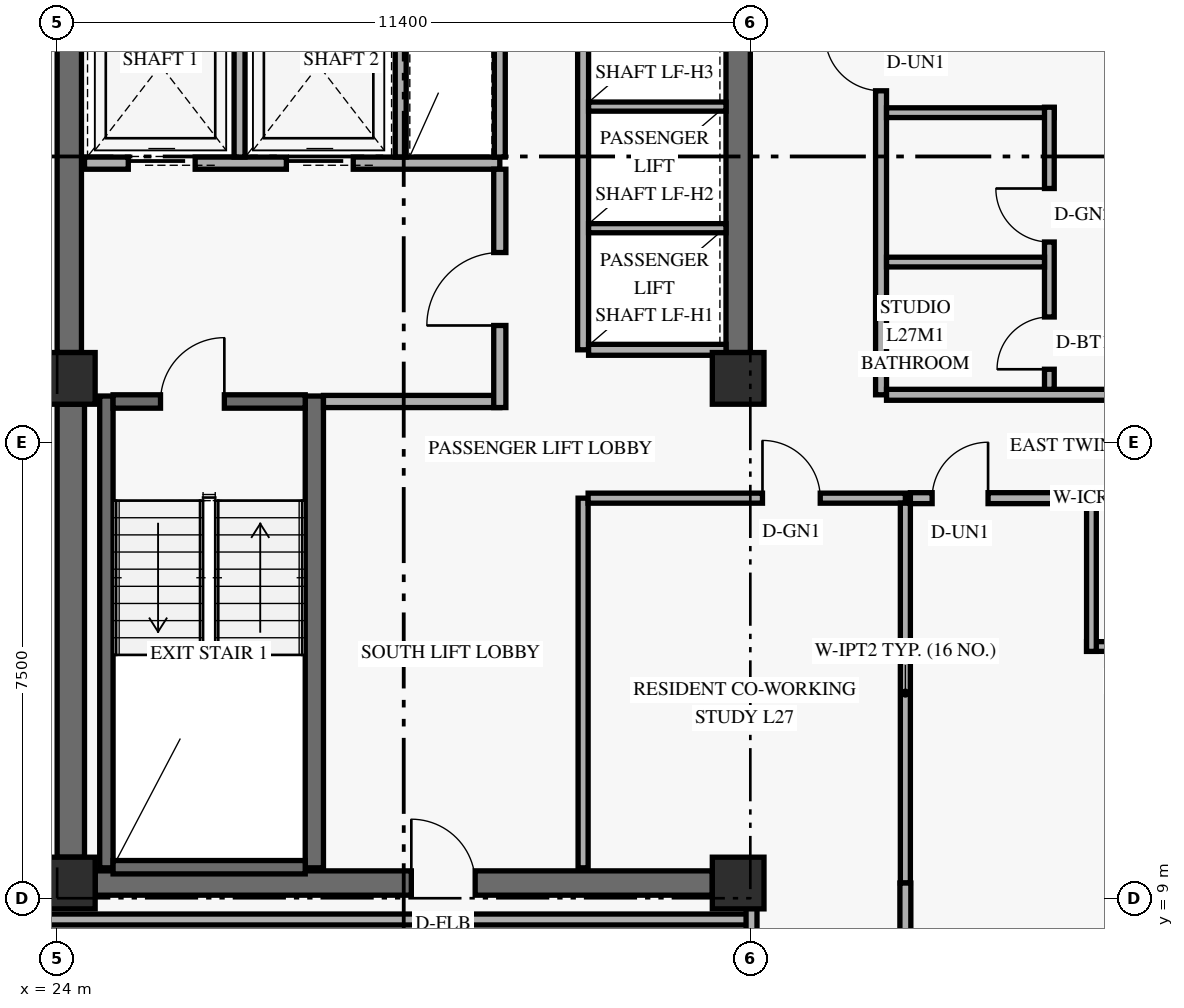
"""IFC4 building model, lengths in metres.
Left out: names, types, materials, properties, quantities, classifications, styles, units other than length and angle.
Written with IfcOpenShell. Run it as: python <this file> out.ifc"""

import sys

from ifc_helpers import new_model, si_unit, direction, frame, frame_2d, origin, origin_2d, place, context, subcontext, project, spatial, rectangle, extrude, element, fill, save


model = new_model("IFC4")
c1 = context("Model", 3, precision=1e-05, world=origin(), true_north=direction((0.0, 1.0)))
c2 = subcontext(c1, "Body", "Model", "MODEL_VIEW")
j1 = project(units=[si_unit("LENGTHUNIT", "METRE"), si_unit("PLANEANGLEUNIT", "RADIAN")], contexts=[c1])
p1 = place(None, origin())
s1 = spatial("IfcSite", under=j1, at=p1, CompositionType="ELEMENT")
p2 = place(p1, origin())
s2 = spatial("IfcBuilding", under=s1, at=p2, CompositionType="ELEMENT")
p3 = place(p2, frame((0.0, 0.0, 106.2)))
s3 = spatial("IfcBuildingStorey", under=s2, at=p3, CompositionType="ELEMENT", Elevation=106.2)
p4 = place(p3, frame((24.225, 9.675, 0.0), z_axis=(0.0, 0.0, 1.0), x_axis=(0.0, 1.0, 0.0)))
e1 = element("IfcWall", 1, at=p4, inside=s3, PredefinedType="SHEAR", context=c2, shape_type="SweptSolid", body=[
    extrude(rectangle(XDim=7.45, YDim=0.45, at=frame_2d((3.725, 0.0))), origin(), (0.0, 0.0, 1.0), 2.749),
])
p5 = place(p3, frame((24.2, 17.975, 0.0), z_axis=(0.0, 0.0, 1.0), x_axis=(0.0, 1.0, 0.0)))
e2 = element("IfcWall", 2, at=p5, inside=s3, PredefinedType="SHEAR", context=c2, shape_type="SweptSolid", body=[
    extrude(rectangle(XDim=11.8, YDim=0.4, at=frame_2d((5.9, 0.0))), origin(), (0.0, 0.0, 1.0), 2.749),
])
p6 = place(p3, frame((35.2, 17.975, 0.0), z_axis=(0.0, 0.0, 1.0), x_axis=(0.0, 1.0, 0.0)))
e3 = element("IfcWall", 3, at=p6, inside=s3, PredefinedType="SHEAR", context=c2, shape_type="SweptSolid", body=[
    extrude(rectangle(XDim=10.125, YDim=0.4, at=frame_2d((5.062, 0.0))), origin(), (0.0, 0.0, 1.0), 2.749),
])
p7 = place(p3, frame((24.625, 9.25, 0.0), z_axis=(0.0, 0.0, 1.0), x_axis=(1.0, 0.0, 0.0)))
e4 = element("IfcWall", 4, at=p7, inside=s3, PredefinedType="SHEAR", context=c2, shape_type="SweptSolid", body=[
    extrude(rectangle(XDim=10.15, YDim=0.4, at=frame_2d((5.075, 0.0))), origin(), (0.0, 0.0, 1.0), 3.36),
])
p8 = place(p7, frame((5.2, 0.0, 0.0)))
e5 = element("IfcOpeningElement", 5, at=p8, cuts=e4, PredefinedType="OPENING", context=c2, shape_type="SweptSolid", body=[
    extrude(rectangle(XDim=1.05, YDim=2.15, at=frame_2d((0.525, 1.075))), frame((0.0, 0.21, 0.0), z_axis=(0.0, -1.0, 0.0), x_axis=(1.0, 0.0, 0.0)), (0.0, 0.0, 1.0), 0.42),
])
p9 = place(p3, frame((24.81, 9.5, 0.0), z_axis=(0.0, 0.0, 1.0), x_axis=(0.0, 1.0, 0.0)))
e6 = element("IfcWall", 6, at=p9, inside=s3, PredefinedType="SHEAR", context=c2, shape_type="SweptSolid", body=[
    extrude(rectangle(XDim=7.76, YDim=0.22, at=frame_2d((3.88, 0.0))), origin(), (0.0, 0.0, 1.0), 3.36),
])
p10 = place(p3, frame((28.23, 9.5, 0.0), z_axis=(0.0, 0.0, 1.0), x_axis=(0.0, 1.0, 0.0)))
e7 = element("IfcWall", 7, at=p10, inside=s3, PredefinedType="SHEAR", context=c2, shape_type="SweptSolid", body=[
    extrude(rectangle(XDim=7.76, YDim=0.3, at=frame_2d((3.88, 0.0))), origin(), (0.0, 0.0, 1.0), 3.36),
])
p11 = place(p3, frame((24.92, 9.51, 0.0), z_axis=(0.0, 0.0, 1.0), x_axis=(1.0, 0.0, 0.0)))
e8 = element("IfcWall", 8, at=p11, inside=s3, PredefinedType="SHEAR", context=c2, shape_type="SweptSolid", body=[
    extrude(rectangle(XDim=3.16, YDim=0.22, at=frame_2d((1.58, 0.0))), origin(), (0.0, 0.0, 1.0), 3.36),
])
p12 = place(p3, frame((24.92, 17.17, 0.0), z_axis=(0.0, 0.0, 1.0), x_axis=(1.0, 0.0, 0.0)))
e9 = element("IfcWall", 9, at=p12, inside=s3, PredefinedType="SHEAR", context=c2, shape_type="SweptSolid", body=[
    extrude(rectangle(XDim=3.16, YDim=0.22, at=frame_2d((1.58, 0.0))), origin(), (0.0, 0.0, 1.0), 3.36),
])
p13 = place(p12, frame((0.78, 0.0, 0.0)))
e10 = element("IfcOpeningElement", 10, at=p13, cuts=e9, PredefinedType="OPENING", context=c2, shape_type="SweptSolid", body=[
    extrude(rectangle(XDim=1.05, YDim=2.15, at=frame_2d((0.525, 1.075))), frame((0.0, 0.12, 0.0), z_axis=(0.0, -1.0, 0.0), x_axis=(1.0, 0.0, 0.0)), (0.0, 0.0, 1.0), 0.24),
])
for number, where, z_axis, x_axis in (
    (11, (24.2, 9.25, 0.0), (0.0, 0.0, 1.0), (1.0, 0.0, 0.0)),
    (12, (24.2, 17.55, 0.0), (0.0, 0.0, 1.0), (1.0, 0.0, 0.0)),
    (13, (35.2, 9.25, 0.0), (0.0, 0.0, 1.0), (1.0, 0.0, 0.0)),
    (14, (35.2, 17.55, 0.0), (0.0, 0.0, 1.0), (1.0, 0.0, 0.0)),
):
    element("IfcColumn", number, at=place(p3, frame(where, z_axis=z_axis, x_axis=x_axis)), inside=s3, PredefinedType="COLUMN", context=c2, shape_type="SweptSolid", body=[
        extrude(rectangle(XDim=0.85, YDim=0.85, at=origin_2d()), origin(), (0.0, 0.0, 1.0), 3.6),
    ])
p14 = place(p3, frame((24.45, 21.09, 0.0), z_axis=(0.0, 0.0, 1.0), x_axis=(1.0, 0.0, 0.0)))
e15 = element("IfcWall", 15, at=p14, inside=s3, PredefinedType="STANDARD", context=c2, shape_type="SweptSolid", body=[
    extrude(rectangle(XDim=6.83, YDim=0.2, at=frame_2d((3.415, 0.0))), origin(), (0.0, 0.0, 1.0), 3.36),
])
p15 = place(p14, frame((0.72, 0.0, 0.0)))
e16 = element("IfcOpeningElement", 16, at=p15, cuts=e15, PredefinedType="OPENING", context=c2, shape_type="SweptSolid", body=[
    extrude(rectangle(XDim=1.1, YDim=2.2, at=frame_2d((0.55, 1.1))), frame((0.0, 0.11, 0.0), z_axis=(0.0, -1.0, 0.0), x_axis=(1.0, 0.0, 0.0)), (0.0, 0.0, 1.0), 0.22),
])
p16 = place(p14, frame((3.32, 0.0, 0.0)))
e17 = element("IfcOpeningElement", 17, at=p16, cuts=e15, PredefinedType="OPENING", context=c2, shape_type="SweptSolid", body=[
    extrude(rectangle(XDim=1.1, YDim=2.2, at=frame_2d((0.55, 1.1))), frame((0.0, 0.11, 0.0), z_axis=(0.0, -1.0, 0.0), x_axis=(1.0, 0.0, 0.0)), (0.0, 0.0, 1.0), 0.22),
])
p17 = place(p3, frame((28.38, 17.17, 0.0), z_axis=(0.0, 0.0, 1.0), x_axis=(1.0, 0.0, 0.0)))
e18 = element("IfcWall", 18, at=p17, inside=s3, PredefinedType="STANDARD", context=c2, shape_type="SweptSolid", body=[
    extrude(rectangle(XDim=2.9, YDim=0.2, at=frame_2d((1.45, 0.0))), origin(), (0.0, 0.0, 1.0), 3.36),
])
p18 = place(p3, frame((31.28, 17.07, 0.0), z_axis=(0.0, 0.0, 1.0), x_axis=(0.0, 1.0, 0.0)))
e19 = element("IfcWall", 19, at=p18, inside=s3, PredefinedType="STANDARD", context=c2, shape_type="SweptSolid", body=[
    extrude(rectangle(XDim=3.92, YDim=0.2, at=frame_2d((1.96, 0.0))), origin(), (0.0, 0.0, 1.0), 2.731),
])
p19 = place(p18, frame((1.35, 0.0, 0.0)))
e20 = element("IfcOpeningElement", 20, at=p19, cuts=e19, PredefinedType="OPENING", context=c2, shape_type="SweptSolid", body=[
    extrude(rectangle(XDim=1.2, YDim=2.15, at=frame_2d((0.6, 1.075))), frame((0.0, 0.11, 0.0), z_axis=(0.0, -1.0, 0.0), x_axis=(1.0, 0.0, 0.0)), (0.0, 0.0, 1.0), 0.22),
])
p20 = place(p3, frame((27.0, 21.19, 0.0), z_axis=(0.0, 0.0, 1.0), x_axis=(0.0, 1.0, 0.0)))
e21 = element("IfcWall", 21, at=p20, inside=s3, PredefinedType="STANDARD", context=c2, shape_type="SweptSolid", body=[
    extrude(rectangle(XDim=3.11, YDim=0.18, at=frame_2d((1.555, 0.0))), origin(), (0.0, 0.0, 1.0), 3.36),
])
for number, where, z_axis, x_axis in (
    (22, (29.65, 21.19, 0.0), (0.0, 0.0, 1.0), (0.0, 1.0, 0.0)),
    (23, (31.28, 21.19, 0.0), (0.0, 0.0, 1.0), (0.0, 1.0, 0.0)),
):
    element("IfcWall", number, at=place(p3, frame(where, z_axis=z_axis, x_axis=x_axis)), inside=s3, PredefinedType="STANDARD", context=c2, shape_type="SweptSolid", body=[
        extrude(rectangle(XDim=3.02, YDim=0.18, at=frame_2d((1.51, 0.0))), origin(), (0.0, 0.0, 1.0), 3.36),
    ])
p21 = place(p3, frame((32.65, 18.02, 0.0), z_axis=(0.0, 0.0, 1.0), x_axis=(0.0, 1.0, 0.0)))
e24 = element("IfcWall", 24, at=p21, inside=s3, PredefinedType="STANDARD", context=c2, shape_type="SweptSolid", body=[
    extrude(rectangle(XDim=10.06, YDim=0.18, at=frame_2d((5.03, 0.0))), origin(), (0.0, 0.0, 1.0), 3.36),
])
p22 = place(p3, frame((32.74, 18.02, 0.0), z_axis=(0.0, 0.0, 1.0), x_axis=(1.0, 0.0, 0.0)))
e25 = element("IfcWall", 25, at=p22, inside=s3, PredefinedType="STANDARD", context=c2, shape_type="SweptSolid", body=[
    extrude(rectangle(XDim=2.26, YDim=0.18, at=frame_2d((1.13, 0.0))), origin(), (0.0, 0.0, 1.0), 3.36),
])
for number, where, z_axis, x_axis in (
    (26, (32.74, 20.02, 0.0), (0.0, 0.0, 1.0), (1.0, 0.0, 0.0)),
    (27, (32.74, 22.02, 0.0), (0.0, 0.0, 1.0), (1.0, 0.0, 0.0)),
):
    element("IfcWall", number, at=place(p3, frame(where, z_axis=z_axis, x_axis=x_axis)), inside=s3, PredefinedType="STANDARD", context=c2, shape_type="SweptSolid", body=[
        extrude(rectangle(XDim=2.26, YDim=0.15, at=frame_2d((1.13, 0.0))), origin(), (0.0, 0.0, 1.0), 3.36),
    ])
p23 = place(p3, frame((32.65, 9.5, 0.0), z_axis=(0.0, 0.0, 1.0), x_axis=(0.0, 1.0, 0.0)))
e28 = element("IfcWall", 28, at=p23, inside=s3, PredefinedType="PARTITIONING", context=c2, shape_type="SweptSolid", body=[
    extrude(rectangle(XDim=6.08, YDim=0.165, at=frame_2d((3.04, 0.0))), origin(), (0.0, 0.0, 1.0), 3.36),
])
p24 = place(p3, frame((32.732, 15.58, 0.0), z_axis=(0.0, 0.0, 1.0), x_axis=(1.0, 0.0, 0.0)))
e29 = element("IfcWall", 29, at=p24, inside=s3, PredefinedType="PARTITIONING", context=c2, shape_type="SweptSolid", body=[
    extrude(rectangle(XDim=5.218, YDim=0.165, at=frame_2d((2.609, 0.0))), origin(), (0.0, 0.0, 1.0), 2.731),
])
p25 = place(p24, frame((2.867, 0.0, 0.0)))
e30 = element("IfcOpeningElement", 30, at=p25, cuts=e29, PredefinedType="OPENING", context=c2, shape_type="SweptSolid", body=[
    extrude(rectangle(XDim=0.95, YDim=2.15, at=frame_2d((0.475, 1.075))), frame((0.0, 0.093, 0.0), z_axis=(0.0, -1.0, 0.0), x_axis=(1.0, 0.0, 0.0)), (0.0, 0.0, 1.0), 0.185),
])
p26 = place(p3, frame((37.95, 9.25, 0.0), z_axis=(0.0, 0.0, 1.0), x_axis=(0.0, 1.0, 0.0)))
e31 = element("IfcWall", 31, at=p26, inside=s3, PredefinedType="PARTITIONING", context=c2, shape_type="SweptSolid", body=[
    extrude(rectangle(XDim=6.248, YDim=0.165, at=frame_2d((3.124, 0.0))), origin(), (0.0, 0.0, 1.0), 2.731),
])
p27 = place(p3, frame((37.55, 17.28, 0.0), z_axis=(0.0, 0.0, 1.0), x_axis=(0.0, 1.0, 0.0)))
e32 = element("IfcWall", 32, at=p27, inside=s3, PredefinedType="STANDARD", context=c2, shape_type="SweptSolid", body=[
    extrude(rectangle(XDim=10.28, YDim=0.18, at=frame_2d((5.14, 0.0))), origin(), (0.0, 0.0, 1.0), 2.731),
])
p28 = place(p27, frame((5.0, 0.0, 0.0)))
e33 = element("IfcOpeningElement", 33, at=p28, cuts=e32, PredefinedType="OPENING", context=c2, shape_type="SweptSolid", body=[
    extrude(rectangle(XDim=0.92, YDim=2.15, at=frame_2d((0.46, 1.075))), frame((0.0, 0.1, 0.0), z_axis=(0.0, -1.0, 0.0), x_axis=(1.0, 0.0, 0.0)), (0.0, 0.0, 1.0), 0.2),
])
p29 = place(p3, frame((38.032, 15.58, 0.0), z_axis=(0.0, 0.0, 1.0), x_axis=(1.0, 0.0, 0.0)))
e34 = element("IfcWall", 34, at=p29, inside=s3, PredefinedType="STANDARD", context=c2, shape_type="SweptSolid", body=[
    extrude(rectangle(XDim=7.568, YDim=0.18, at=frame_2d((3.784, 0.0))), origin(), (0.0, 0.0, 1.0), 2.731),
])
p30 = place(p29, frame((0.357, 0.0, 0.0)))
e35 = element("IfcOpeningElement", 35, at=p30, cuts=e34, PredefinedType="OPENING", context=c2, shape_type="SweptSolid", body=[
    extrude(rectangle(XDim=0.92, YDim=2.15, at=frame_2d((0.46, 1.075))), frame((0.0, 0.1, 0.0), z_axis=(0.0, -1.0, 0.0), x_axis=(1.0, 0.0, 0.0)), (0.0, 0.0, 1.0), 0.2),
])
p31 = place(p3, frame((37.64, 17.28, 0.0), z_axis=(0.0, 0.0, 1.0), x_axis=(1.0, 0.0, 0.0)))
e36 = element("IfcWall", 36, at=p31, inside=s3, PredefinedType="STANDARD", context=c2, shape_type="SweptSolid", body=[
    extrude(rectangle(XDim=7.96, YDim=0.18, at=frame_2d((3.98, 0.0))), origin(), (0.0, 0.0, 1.0), 2.731),
])
p32 = place(p3, frame((23.85, 8.65, 0.0), z_axis=(0.0, 0.0, 1.0), x_axis=(1.0, 0.0, 0.0)))
e37 = element("IfcWall", 37, at=p32, inside=s3, PredefinedType="STANDARD", context=c2, shape_type="SweptSolid", body=[
    extrude(rectangle(XDim=11.57, YDim=0.18, at=frame_2d((5.785, 0.0))), origin(), (0.0, 0.0, 1.0), 2.731),
])
p33 = place(p3, frame((35.42, 2.98, 0.0), z_axis=(0.0, 0.0, 1.0), x_axis=(0.0, 1.0, 0.0)))
e38 = element("IfcWall", 38, at=p33, inside=s3, PredefinedType="PARTITIONING", context=c2, shape_type="SweptSolid", body=[
    extrude(rectangle(XDim=6.27, YDim=0.18, at=frame_2d((3.135, 0.0))), origin(), (0.0, 0.0, 1.0), 2.731),
])
p34 = place(p33, frame((1.57, 0.0, 0.0)))
e39 = element("IfcOpeningElement", 39, at=p34, cuts=e38, PredefinedType="OPENING", context=c2, shape_type="SweptSolid", body=[
    extrude(rectangle(XDim=0.88, YDim=2.12, at=frame_2d((0.44, 1.06))), frame((0.0, 0.1, 0.0), z_axis=(0.0, -1.0, 0.0), x_axis=(1.0, 0.0, 0.0)), (0.0, 0.0, 1.0), 0.2),
])
p35 = place(p3, frame((37.95, 2.98, 0.0), z_axis=(0.0, 0.0, 1.0), x_axis=(0.0, 1.0, 0.0)))
e40 = element("IfcWall", 40, at=p35, inside=s3, PredefinedType="PARTITIONING", context=c2, shape_type="SweptSolid", body=[
    extrude(rectangle(XDim=6.27, YDim=0.18, at=frame_2d((3.135, 0.0))), origin(), (0.0, 0.0, 1.0), 2.731),
])
p36 = place(p3, frame((40.93, 13.14, 0.0), z_axis=(0.0, 0.0, 1.0), x_axis=(1.0, 0.0, 0.0)))
e41 = element("IfcWall", 41, at=p36, inside=s3, PredefinedType="PLUMBINGWALL", context=c2, shape_type="SweptSolid", body=[
    extrude(rectangle(XDim=4.67, YDim=0.16, at=frame_2d((2.335, 0.0))), origin(), (0.0, 0.0, 1.0), 2.731),
])
p37 = place(p36, frame((0.35, 0.0, 0.0)))
e42 = element("IfcOpeningElement", 42, at=p37, cuts=e41, PredefinedType="OPENING", context=c2, shape_type="SweptSolid", body=[
    extrude(rectangle(XDim=0.88, YDim=2.12, at=frame_2d((0.44, 1.06))), frame((0.0, 0.09, 0.0), z_axis=(0.0, -1.0, 0.0), x_axis=(1.0, 0.0, 0.0)), (0.0, 0.0, 1.0), 0.18),
])
p38 = place(p36, frame((2.72, 0.0, 0.0)))
e43 = element("IfcOpeningElement", 43, at=p38, cuts=e41, PredefinedType="OPENING", context=c2, shape_type="SweptSolid", body=[
    extrude(rectangle(XDim=0.86, YDim=2.12, at=frame_2d((0.43, 1.06))), frame((0.0, 0.09, 0.0), z_axis=(0.0, -1.0, 0.0), x_axis=(1.0, 0.0, 0.0)), (0.0, 0.0, 1.0), 0.18),
])
p39 = place(p3, frame((41.01, 13.06, 0.0), z_axis=(0.0, 0.0, 1.0), x_axis=(0.0, 1.0, 0.0)))
e44 = element("IfcWall", 44, at=p39, inside=s3, PredefinedType="PLUMBINGWALL", context=c2, shape_type="SweptSolid", body=[
    extrude(rectangle(XDim=2.43, YDim=0.16, at=frame_2d((1.215, 0.0))), origin(), (0.0, 0.0, 1.0), 2.988),
])
p40 = place(p3, frame((37.64, 21.92, 0.0), z_axis=(0.0, 0.0, 1.0), x_axis=(1.0, 0.0, 0.0)))
e45 = element("IfcWall", 45, at=p40, inside=s3, PredefinedType="PLUMBINGWALL", context=c2, shape_type="SweptSolid", body=[
    extrude(rectangle(XDim=2.758, YDim=0.16, at=frame_2d((1.379, 0.0))), origin(), (0.0, 0.0, 1.0), 3.36),
])
p41 = place(p3, frame((40.318, 17.37, 0.0), z_axis=(0.0, 0.0, 1.0), x_axis=(0.0, 1.0, 0.0)))
e46 = element("IfcWall", 46, at=p41, inside=s3, PredefinedType="PLUMBINGWALL", context=c2, shape_type="SweptSolid", body=[
    extrude(rectangle(XDim=4.64, YDim=0.16, at=frame_2d((2.32, 0.0))), origin(), (0.0, 0.0, 1.0), 2.731),
])
p42 = place(p41, frame((0.33, 0.0, 0.0)))
e47 = element("IfcOpeningElement", 47, at=p42, cuts=e46, PredefinedType="OPENING", context=c2, shape_type="SweptSolid", body=[
    extrude(rectangle(XDim=0.86, YDim=2.12, at=frame_2d((0.43, 1.06))), frame((0.0, 0.09, 0.0), z_axis=(0.0, -1.0, 0.0), x_axis=(1.0, 0.0, 0.0)), (0.0, 0.0, 1.0), 0.18),
])
p43 = place(p41, frame((2.423, 0.0, 0.0)))
e48 = element("IfcOpeningElement", 48, at=p43, cuts=e46, PredefinedType="OPENING", context=c2, shape_type="SweptSolid", body=[
    extrude(rectangle(XDim=0.88, YDim=2.12, at=frame_2d((0.44, 1.06))), frame((0.0, 0.09, 0.0), z_axis=(0.0, -1.0, 0.0), x_axis=(1.0, 0.0, 0.0)), (0.0, 0.0, 1.0), 0.18),
])
p44 = place(p3, frame((37.64, 19.463, 0.0), z_axis=(0.0, 0.0, 1.0), x_axis=(1.0, 0.0, 0.0)))
e49 = element("IfcWall", 49, at=p44, inside=s3, PredefinedType="PLUMBINGWALL", context=c2, shape_type="SweptSolid", body=[
    extrude(rectangle(XDim=2.598, YDim=0.16, at=frame_2d((1.299, 0.0))), origin(), (0.0, 0.0, 1.0), 3.36),
])
p45 = place(p13, frame((1.05, 0.0, 0.0), z_axis=(0.0, 0.0, 1.0), x_axis=(-1.0, 0.0, 0.0)))
e50 = element("IfcDoor", 50, at=p45, inside=s3, OperationType="SINGLE_SWING_LEFT", PredefinedType="DOOR", context=c2, shape_type="SweptSolid", body=[
    extrude(rectangle(XDim=1.05, YDim=2.15, at=frame_2d((0.525, 1.075))), frame((0.0, 0.025, 0.0), z_axis=(0.0, -1.0, 0.0), x_axis=(1.0, 0.0, 0.0)), (0.0, 0.0, 1.0), 0.05),
])
fill(e10, e50)
p46 = place(p15, origin())
e51 = element("IfcDoor", 51, at=p46, inside=s3, OperationType="SLIDING_TO_LEFT", PredefinedType="DOOR", context=c2, shape_type="SweptSolid", body=[
    extrude(rectangle(XDim=1.1, YDim=2.2, at=frame_2d((0.55, 1.1))), frame((0.0, 0.025, 0.0), z_axis=(0.0, -1.0, 0.0), x_axis=(1.0, 0.0, 0.0)), (0.0, 0.0, 1.0), 0.05),
])
fill(e16, e51)
p47 = place(p16, origin())
e52 = element("IfcDoor", 52, at=p47, inside=s3, OperationType="SLIDING_TO_LEFT", PredefinedType="DOOR", context=c2, shape_type="SweptSolid", body=[
    extrude(rectangle(XDim=1.1, YDim=2.2, at=frame_2d((0.55, 1.1))), frame((0.0, 0.025, 0.0), z_axis=(0.0, -1.0, 0.0), x_axis=(1.0, 0.0, 0.0)), (0.0, 0.0, 1.0), 0.05),
])
fill(e17, e52)
p48 = place(p19, origin())
e53 = element("IfcDoor", 53, at=p48, inside=s3, OperationType="SINGLE_SWING_LEFT", PredefinedType="DOOR", context=c2, shape_type="SweptSolid", body=[
    extrude(rectangle(XDim=1.2, YDim=2.15, at=frame_2d((0.6, 1.075))), frame((0.0, 0.025, 0.0), z_axis=(0.0, -1.0, 0.0), x_axis=(1.0, 0.0, 0.0)), (0.0, 0.0, 1.0), 0.05),
])
fill(e20, e53)
p49 = place(p25, origin())
e54 = element("IfcDoor", 54, at=p49, inside=s3, OperationType="SINGLE_SWING_LEFT", PredefinedType="DOOR", context=c2, shape_type="SweptSolid", body=[
    extrude(rectangle(XDim=0.95, YDim=2.15, at=frame_2d((0.475, 1.075))), frame((0.0, 0.025, 0.0), z_axis=(0.0, -1.0, 0.0), x_axis=(1.0, 0.0, 0.0)), (0.0, 0.0, 1.0), 0.05),
])
fill(e30, e54)
p50 = place(p8, origin())
e55 = element("IfcDoor", 55, at=p50, inside=s3, OperationType="SINGLE_SWING_LEFT", PredefinedType="DOOR", context=c2, shape_type="SweptSolid", body=[
    extrude(rectangle(XDim=1.05, YDim=2.15, at=frame_2d((0.525, 1.075))), frame((0.0, 0.025, 0.0), z_axis=(0.0, -1.0, 0.0), x_axis=(1.0, 0.0, 0.0)), (0.0, 0.0, 1.0), 0.05),
])
fill(e5, e55)
p51 = place(p30, origin())
e56 = element("IfcDoor", 56, at=p51, inside=s3, OperationType="SINGLE_SWING_RIGHT", PredefinedType="DOOR", context=c2, shape_type="SweptSolid", body=[
    extrude(rectangle(XDim=0.92, YDim=2.15, at=frame_2d((0.46, 1.075))), frame((0.0, 0.025, 0.0), z_axis=(0.0, -1.0, 0.0), x_axis=(1.0, 0.0, 0.0)), (0.0, 0.0, 1.0), 0.05),
])
fill(e35, e56)
p52 = place(p28, origin())
e57 = element("IfcDoor", 57, at=p52, inside=s3, OperationType="SINGLE_SWING_RIGHT", PredefinedType="DOOR", context=c2, shape_type="SweptSolid", body=[
    extrude(rectangle(XDim=0.92, YDim=2.15, at=frame_2d((0.46, 1.075))), frame((0.0, 0.025, 0.0), z_axis=(0.0, -1.0, 0.0), x_axis=(1.0, 0.0, 0.0)), (0.0, 0.0, 1.0), 0.05),
])
fill(e33, e57)
p53 = place(p42, origin())
e58 = element("IfcDoor", 58, at=p53, inside=s3, OperationType="SINGLE_SWING_LEFT", PredefinedType="DOOR", context=c2, shape_type="SweptSolid", body=[
    extrude(rectangle(XDim=0.86, YDim=2.12, at=frame_2d((0.43, 1.06))), frame((0.0, 0.025, 0.0), z_axis=(0.0, -1.0, 0.0), x_axis=(1.0, 0.0, 0.0)), (0.0, 0.0, 1.0), 0.05),
])
fill(e47, e58)
p54 = place(p43, origin())
e59 = element("IfcDoor", 59, at=p54, inside=s3, OperationType="SINGLE_SWING_RIGHT", PredefinedType="DOOR", context=c2, shape_type="SweptSolid", body=[
    extrude(rectangle(XDim=0.88, YDim=2.12, at=frame_2d((0.44, 1.06))), frame((0.0, 0.025, 0.0), z_axis=(0.0, -1.0, 0.0), x_axis=(1.0, 0.0, 0.0)), (0.0, 0.0, 1.0), 0.05),
])
fill(e48, e59)
save(model, sys.argv[1])
